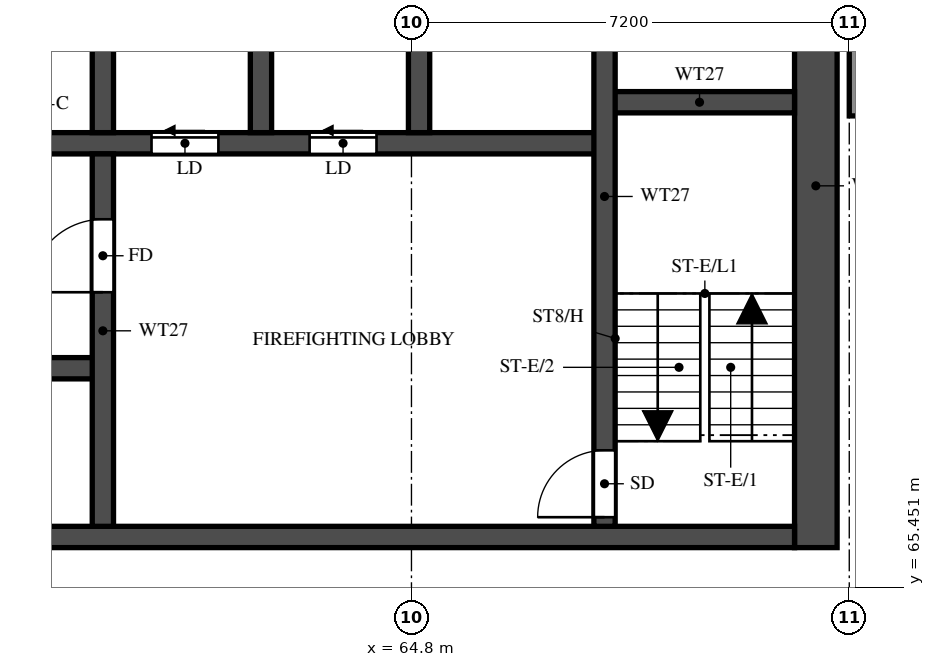
"""IFC4 building model, lengths in metres.
Left out: names, types, materials, properties, quantities, classifications, styles, units other than length and angle.
Written with IfcOpenShell. Run it as: python <this file> out.ifc"""

import sys

from ifc_helpers import new_model, si_unit, direction, frame, frame_2d, origin, place, context, subcontext, project, spatial, rectangle, extrude, element, fill, save


model = new_model("IFC4")
c1 = context("Model", 3, precision=1e-05, world=origin(), true_north=direction((0.0, 1.0)))
c2 = subcontext(c1, "Body", "Model", "MODEL_VIEW")
j1 = project(units=[si_unit("LENGTHUNIT", "METRE"), si_unit("PLANEANGLEUNIT", "RADIAN")], contexts=[c1])
p1 = place(None, origin())
s1 = spatial("IfcSite", under=j1, at=p1, CompositionType="ELEMENT")
p2 = place(p1, origin())
s2 = spatial("IfcBuilding", under=s1, at=p2, CompositionType="ELEMENT")
p3 = place(p2, frame((0.0, 0.0, 116.5)))
s3 = spatial("IfcBuildingStorey", under=s2, at=p3, CompositionType="ELEMENT", Elevation=116.5)
p4 = place(p3, frame((71.45, 66.1, 0.0), z_axis=(0.0, 0.0, 1.0), x_axis=(0.0, 1.0, 0.0)))
e1 = element("IfcWall", 1, at=p4, inside=s3, PredefinedType="SHEAR", context=c2, shape_type="SweptSolid", body=[
    extrude(rectangle(XDim=11.9, YDim=0.7, at=frame_2d((5.95, 0.0))), origin(), (0.0, 0.0, 1.0), 3.2),
])
p5 = place(p3, frame((29.7, 66.275, 0.0), z_axis=(0.0, 0.0, 1.0), x_axis=(1.0, 0.0, 0.0)))
e2 = element("IfcWall", 2, at=p5, inside=s3, PredefinedType="SHEAR", context=c2, shape_type="SweptSolid", body=[
    extrude(rectangle(XDim=41.4, YDim=0.35, at=frame_2d((20.7, 0.0))), origin(), (0.0, 0.0, 1.0), 3.2),
])
p6 = place(p5, frame((0.925, 0.0, 0.0)))
e3 = element("IfcOpeningElement", 3, at=p6, cuts=e2, PredefinedType="OPENING", context=c2, shape_type="SweptSolid", body=[
    extrude(rectangle(XDim=1.1, YDim=2.1, at=frame_2d((0.55, 1.05))), frame((0.0, 0.185, 0.0), z_axis=(0.0, -1.0, 0.0), x_axis=(1.0, 0.0, 0.0)), (0.0, 0.0, 1.0), 0.37),
])
p7 = place(p5, frame((3.712, 0.0, 0.0)))
e4 = element("IfcOpeningElement", 4, at=p7, cuts=e2, PredefinedType="OPENING", context=c2, shape_type="SweptSolid", body=[
    extrude(rectangle(XDim=1.8, YDim=2.1, at=frame_2d((0.9, 1.05))), frame((0.0, 0.185, 0.0), z_axis=(0.0, -1.0, 0.0), x_axis=(1.0, 0.0, 0.0)), (0.0, 0.0, 1.0), 0.37),
])
p8 = place(p3, frame((35.625, 69.05, 0.0), z_axis=(0.0, 0.0, 1.0), x_axis=(1.0, 0.0, 0.0)))
e5 = element("IfcWall", 5, at=p8, inside=s3, PredefinedType="SHEAR", context=c2, shape_type="SweptSolid", body=[
    extrude(rectangle(XDim=24.1, YDim=0.35, at=frame_2d((12.05, 0.0))), origin(), (0.0, 0.0, 1.0), 3.2),
])
p9 = place(p8, frame((1.0, 0.0, 0.0)))
e6 = element("IfcOpeningElement", 6, at=p9, cuts=e5, PredefinedType="OPENING", context=c2, shape_type="SweptSolid", body=[
    extrude(rectangle(XDim=1.1, YDim=2.1, at=frame_2d((0.55, 1.05))), frame((0.0, 0.185, 0.0), z_axis=(0.0, -1.0, 0.0), x_axis=(1.0, 0.0, 0.0)), (0.0, 0.0, 1.0), 0.37),
])
p10 = place(p8, frame((3.75, 0.0, 0.0)))
e7 = element("IfcOpeningElement", 7, at=p10, cuts=e5, PredefinedType="OPENING", context=c2, shape_type="SweptSolid", body=[
    extrude(rectangle(XDim=1.1, YDim=2.1, at=frame_2d((0.55, 1.05))), frame((0.0, 0.185, 0.0), z_axis=(0.0, -1.0, 0.0), x_axis=(1.0, 0.0, 0.0)), (0.0, 0.0, 1.0), 0.37),
])
p11 = place(p8, frame((6.5, 0.0, 0.0)))
e8 = element("IfcOpeningElement", 8, at=p11, cuts=e5, PredefinedType="OPENING", context=c2, shape_type="SweptSolid", body=[
    extrude(rectangle(XDim=1.1, YDim=2.1, at=frame_2d((0.55, 1.05))), frame((0.0, 0.185, 0.0), z_axis=(0.0, -1.0, 0.0), x_axis=(1.0, 0.0, 0.0)), (0.0, 0.0, 1.0), 0.37),
])
p12 = place(p8, frame((9.25, 0.0, 0.0)))
e9 = element("IfcOpeningElement", 9, at=p12, cuts=e5, PredefinedType="OPENING", context=c2, shape_type="SweptSolid", body=[
    extrude(rectangle(XDim=1.1, YDim=2.1, at=frame_2d((0.55, 1.05))), frame((0.0, 0.185, 0.0), z_axis=(0.0, -1.0, 0.0), x_axis=(1.0, 0.0, 0.0)), (0.0, 0.0, 1.0), 0.37),
])
p13 = place(p8, frame((12.0, 0.0, 0.0)))
e10 = element("IfcOpeningElement", 10, at=p13, cuts=e5, PredefinedType="OPENING", context=c2, shape_type="SweptSolid", body=[
    extrude(rectangle(XDim=1.1, YDim=2.1, at=frame_2d((0.55, 1.05))), frame((0.0, 0.185, 0.0), z_axis=(0.0, -1.0, 0.0), x_axis=(1.0, 0.0, 0.0)), (0.0, 0.0, 1.0), 0.37),
])
p14 = place(p8, frame((14.75, 0.0, 0.0)))
e11 = element("IfcOpeningElement", 11, at=p14, cuts=e5, PredefinedType="OPENING", context=c2, shape_type="SweptSolid", body=[
    extrude(rectangle(XDim=1.1, YDim=2.1, at=frame_2d((0.55, 1.05))), frame((0.0, 0.185, 0.0), z_axis=(0.0, -1.0, 0.0), x_axis=(1.0, 0.0, 0.0)), (0.0, 0.0, 1.0), 0.37),
])
p15 = place(p3, frame((32.825, 72.75, 0.0), z_axis=(0.0, 0.0, 1.0), x_axis=(1.0, 0.0, 0.0)))
e12 = element("IfcWall", 12, at=p15, inside=s3, PredefinedType="SHEAR", context=c2, shape_type="SweptSolid", body=[
    extrude(rectangle(XDim=35.15, YDim=0.35, at=frame_2d((17.575, 0.0))), origin(), (0.0, 0.0, 1.0), 3.2),
])
p16 = place(p15, frame((19.8, 0.0, 0.0)))
e13 = element("IfcOpeningElement", 13, at=p16, cuts=e12, PredefinedType="OPENING", context=c2, shape_type="SweptSolid", body=[
    extrude(rectangle(XDim=1.1, YDim=2.1, at=frame_2d((0.55, 1.05))), frame((0.0, 0.185, 0.0), z_axis=(0.0, -1.0, 0.0), x_axis=(1.0, 0.0, 0.0)), (0.0, 0.0, 1.0), 0.37),
])
p17 = place(p15, frame((27.7, 0.0, 0.0)))
e14 = element("IfcOpeningElement", 14, at=p17, cuts=e12, PredefinedType="OPENING", context=c2, shape_type="SweptSolid", body=[
    extrude(rectangle(XDim=1.1, YDim=2.1, at=frame_2d((0.55, 1.05))), frame((0.0, 0.185, 0.0), z_axis=(0.0, -1.0, 0.0), x_axis=(1.0, 0.0, 0.0)), (0.0, 0.0, 1.0), 0.37),
])
p18 = place(p15, frame((30.3, 0.0, 0.0)))
e15 = element("IfcOpeningElement", 15, at=p18, cuts=e12, PredefinedType="OPENING", context=c2, shape_type="SweptSolid", body=[
    extrude(rectangle(XDim=1.1, YDim=2.1, at=frame_2d((0.55, 1.05))), frame((0.0, 0.185, 0.0), z_axis=(0.0, -1.0, 0.0), x_axis=(1.0, 0.0, 0.0)), (0.0, 0.0, 1.0), 0.37),
])
p19 = place(p15, frame((3.8, 0.0, 0.0)))
e16 = element("IfcOpeningElement", 16, at=p19, cuts=e12, PredefinedType="OPENING", context=c2, shape_type="SweptSolid", body=[
    extrude(rectangle(XDim=1.1, YDim=2.1, at=frame_2d((0.55, 1.05))), frame((0.0, 0.185, 0.0), z_axis=(0.0, -1.0, 0.0), x_axis=(1.0, 0.0, 0.0)), (0.0, 0.0, 1.0), 0.37),
])
p20 = place(p15, frame((6.55, 0.0, 0.0)))
e17 = element("IfcOpeningElement", 17, at=p20, cuts=e12, PredefinedType="OPENING", context=c2, shape_type="SweptSolid", body=[
    extrude(rectangle(XDim=1.1, YDim=2.1, at=frame_2d((0.55, 1.05))), frame((0.0, 0.185, 0.0), z_axis=(0.0, -1.0, 0.0), x_axis=(1.0, 0.0, 0.0)), (0.0, 0.0, 1.0), 0.37),
])
p21 = place(p15, frame((9.3, 0.0, 0.0)))
e18 = element("IfcOpeningElement", 18, at=p21, cuts=e12, PredefinedType="OPENING", context=c2, shape_type="SweptSolid", body=[
    extrude(rectangle(XDim=1.1, YDim=2.1, at=frame_2d((0.55, 1.05))), frame((0.0, 0.185, 0.0), z_axis=(0.0, -1.0, 0.0), x_axis=(1.0, 0.0, 0.0)), (0.0, 0.0, 1.0), 0.37),
])
p22 = place(p15, frame((12.05, 0.0, 0.0)))
e19 = element("IfcOpeningElement", 19, at=p22, cuts=e12, PredefinedType="OPENING", context=c2, shape_type="SweptSolid", body=[
    extrude(rectangle(XDim=1.1, YDim=2.1, at=frame_2d((0.55, 1.05))), frame((0.0, 0.185, 0.0), z_axis=(0.0, -1.0, 0.0), x_axis=(1.0, 0.0, 0.0)), (0.0, 0.0, 1.0), 0.37),
])
p23 = place(p15, frame((14.8, 0.0, 0.0)))
e20 = element("IfcOpeningElement", 20, at=p23, cuts=e12, PredefinedType="OPENING", context=c2, shape_type="SweptSolid", body=[
    extrude(rectangle(XDim=1.1, YDim=2.1, at=frame_2d((0.55, 1.05))), frame((0.0, 0.185, 0.0), z_axis=(0.0, -1.0, 0.0), x_axis=(1.0, 0.0, 0.0)), (0.0, 0.0, 1.0), 0.37),
])
p24 = place(p15, frame((17.55, 0.0, 0.0)))
e21 = element("IfcOpeningElement", 21, at=p24, cuts=e12, PredefinedType="OPENING", context=c2, shape_type="SweptSolid", body=[
    extrude(rectangle(XDim=1.1, YDim=2.1, at=frame_2d((0.55, 1.05))), frame((0.0, 0.185, 0.0), z_axis=(0.0, -1.0, 0.0), x_axis=(1.0, 0.0, 0.0)), (0.0, 0.0, 1.0), 0.37),
])
p25 = place(p15, frame((0.938, 0.0, 0.0)))
e22 = element("IfcOpeningElement", 22, at=p25, cuts=e12, PredefinedType="OPENING", context=c2, shape_type="SweptSolid", body=[
    extrude(rectangle(XDim=1.1, YDim=2.1, at=frame_2d((0.55, 1.05))), frame((0.0, 0.185, 0.0), z_axis=(0.0, -1.0, 0.0), x_axis=(1.0, 0.0, 0.0)), (0.0, 0.0, 1.0), 0.37),
])
p26 = place(p3, frame((67.975, 73.425, 0.0), z_axis=(0.0, 0.0, 1.0), x_axis=(1.0, 0.0, 0.0)))
e23 = element("IfcWall", 23, at=p26, inside=s3, PredefinedType="SHEAR", context=c2, shape_type="SweptSolid", body=[
    extrude(rectangle(XDim=3.125, YDim=0.35, at=frame_2d((1.562, 0.0))), origin(), (0.0, 0.0, 1.0), 3.2),
])
p27 = place(p3, frame((67.975, 66.45, 0.0), z_axis=(0.0, 0.0, 1.0), x_axis=(0.0, 1.0, 0.0)))
e24 = element("IfcWall", 24, at=p27, inside=s3, PredefinedType="SHEAR", context=c2, shape_type="SweptSolid", body=[
    extrude(rectangle(XDim=10.85, YDim=0.35, at=frame_2d((5.425, 0.0))), origin(), (0.0, 0.0, 1.0), 3.2),
])
p28 = place(p27, frame((0.15, 0.0, 0.0)))
e25 = element("IfcOpeningElement", 25, at=p28, cuts=e24, PredefinedType="OPENING", context=c2, shape_type="SweptSolid", body=[
    extrude(rectangle(XDim=1.1, YDim=2.1, at=frame_2d((0.55, 1.05))), frame((0.0, 0.185, 0.0), z_axis=(0.0, -1.0, 0.0), x_axis=(1.0, 0.0, 0.0)), (0.0, 0.0, 1.0), 0.37),
])
p29 = place(p3, frame((59.725, 66.45, 0.0), z_axis=(0.0, 0.0, 1.0), x_axis=(0.0, 1.0, 0.0)))
e26 = element("IfcWall", 26, at=p29, inside=s3, PredefinedType="SHEAR", context=c2, shape_type="SweptSolid", body=[
    extrude(rectangle(XDim=6.125, YDim=0.35, at=frame_2d((3.062, 0.0))), origin(), (0.0, 0.0, 1.0), 3.2),
])
p30 = place(p29, frame((3.85, 0.0, 0.0)))
e27 = element("IfcOpeningElement", 27, at=p30, cuts=e26, PredefinedType="OPENING", context=c2, shape_type="SweptSolid", body=[
    extrude(rectangle(XDim=1.2, YDim=2.1, at=frame_2d((0.6, 1.05))), frame((0.0, 0.185, 0.0), z_axis=(0.0, -1.0, 0.0), x_axis=(1.0, 0.0, 0.0)), (0.0, 0.0, 1.0), 0.37),
])
for number, where, z_axis, x_axis in (
    (28, (59.725, 72.925, 0.0), (0.0, 0.0, 1.0), (0.0, 1.0, 0.0)),
    (29, (62.325, 72.925, 0.0), (0.0, 0.0, 1.0), (0.0, 1.0, 0.0)),
    (30, (64.925, 72.925, 0.0), (0.0, 0.0, 1.0), (0.0, 1.0, 0.0)),
):
    element("IfcWall", number, at=place(p3, frame(where, z_axis=z_axis, x_axis=x_axis)), inside=s3, PredefinedType="SHEAR", context=c2, shape_type="SweptSolid", body=[
        extrude(rectangle(XDim=2.95, YDim=0.35, at=frame_2d((1.475, 0.0))), origin(), (0.0, 0.0, 1.0), 3.2),
    ])
p31 = place(p3, frame((72.1, 73.2, 0.0), z_axis=(0.0, 0.0, 1.0), x_axis=(0.0, 1.0, 0.0)))
e31 = element("IfcWall", 31, at=p31, inside=s3, PredefinedType="SOLIDWALL", context=c2, shape_type="SweptSolid", body=[
    extrude(rectangle(XDim=4.8, YDim=0.2, at=frame_2d((2.4, 0.0))), origin(), (0.0, 0.0, 1.0), 3.2),
])
p32 = place(p28, origin())
e32 = element("IfcDoor", 32, at=p32, inside=s3, OperationType="SINGLE_SWING_LEFT", PredefinedType="DOOR", context=c2, shape_type="SweptSolid", body=[
    extrude(rectangle(XDim=1.1, YDim=2.1, at=frame_2d((0.55, 1.05))), frame((0.0, 0.025, 0.0), z_axis=(0.0, -1.0, 0.0), x_axis=(1.0, 0.0, 0.0)), (0.0, 0.0, 1.0), 0.05),
])
fill(e25, e32)
p33 = place(p30, origin())
e33 = element("IfcDoor", 33, at=p33, inside=s3, OperationType="SINGLE_SWING_LEFT", PredefinedType="DOOR", context=c2, shape_type="SweptSolid", body=[
    extrude(rectangle(XDim=1.2, YDim=2.1, at=frame_2d((0.6, 1.05))), frame((0.0, 0.025, 0.0), z_axis=(0.0, -1.0, 0.0), x_axis=(1.0, 0.0, 0.0)), (0.0, 0.0, 1.0), 0.05),
])
fill(e27, e33)
p34 = place(p17, origin())
e34 = element("IfcDoor", 34, at=p34, inside=s3, OperationType="SLIDING_TO_LEFT", PredefinedType="DOOR", context=c2, shape_type="SweptSolid", body=[
    extrude(rectangle(XDim=1.1, YDim=2.1, at=frame_2d((0.55, 1.05))), frame((0.0, 0.025, 0.0), z_axis=(0.0, -1.0, 0.0), x_axis=(1.0, 0.0, 0.0)), (0.0, 0.0, 1.0), 0.05),
])
fill(e14, e34)
p35 = place(p18, origin())
e35 = element("IfcDoor", 35, at=p35, inside=s3, OperationType="SLIDING_TO_LEFT", PredefinedType="DOOR", context=c2, shape_type="SweptSolid", body=[
    extrude(rectangle(XDim=1.1, YDim=2.1, at=frame_2d((0.55, 1.05))), frame((0.0, 0.025, 0.0), z_axis=(0.0, -1.0, 0.0), x_axis=(1.0, 0.0, 0.0)), (0.0, 0.0, 1.0), 0.05),
])
fill(e15, e35)
save(model, sys.argv[1])
